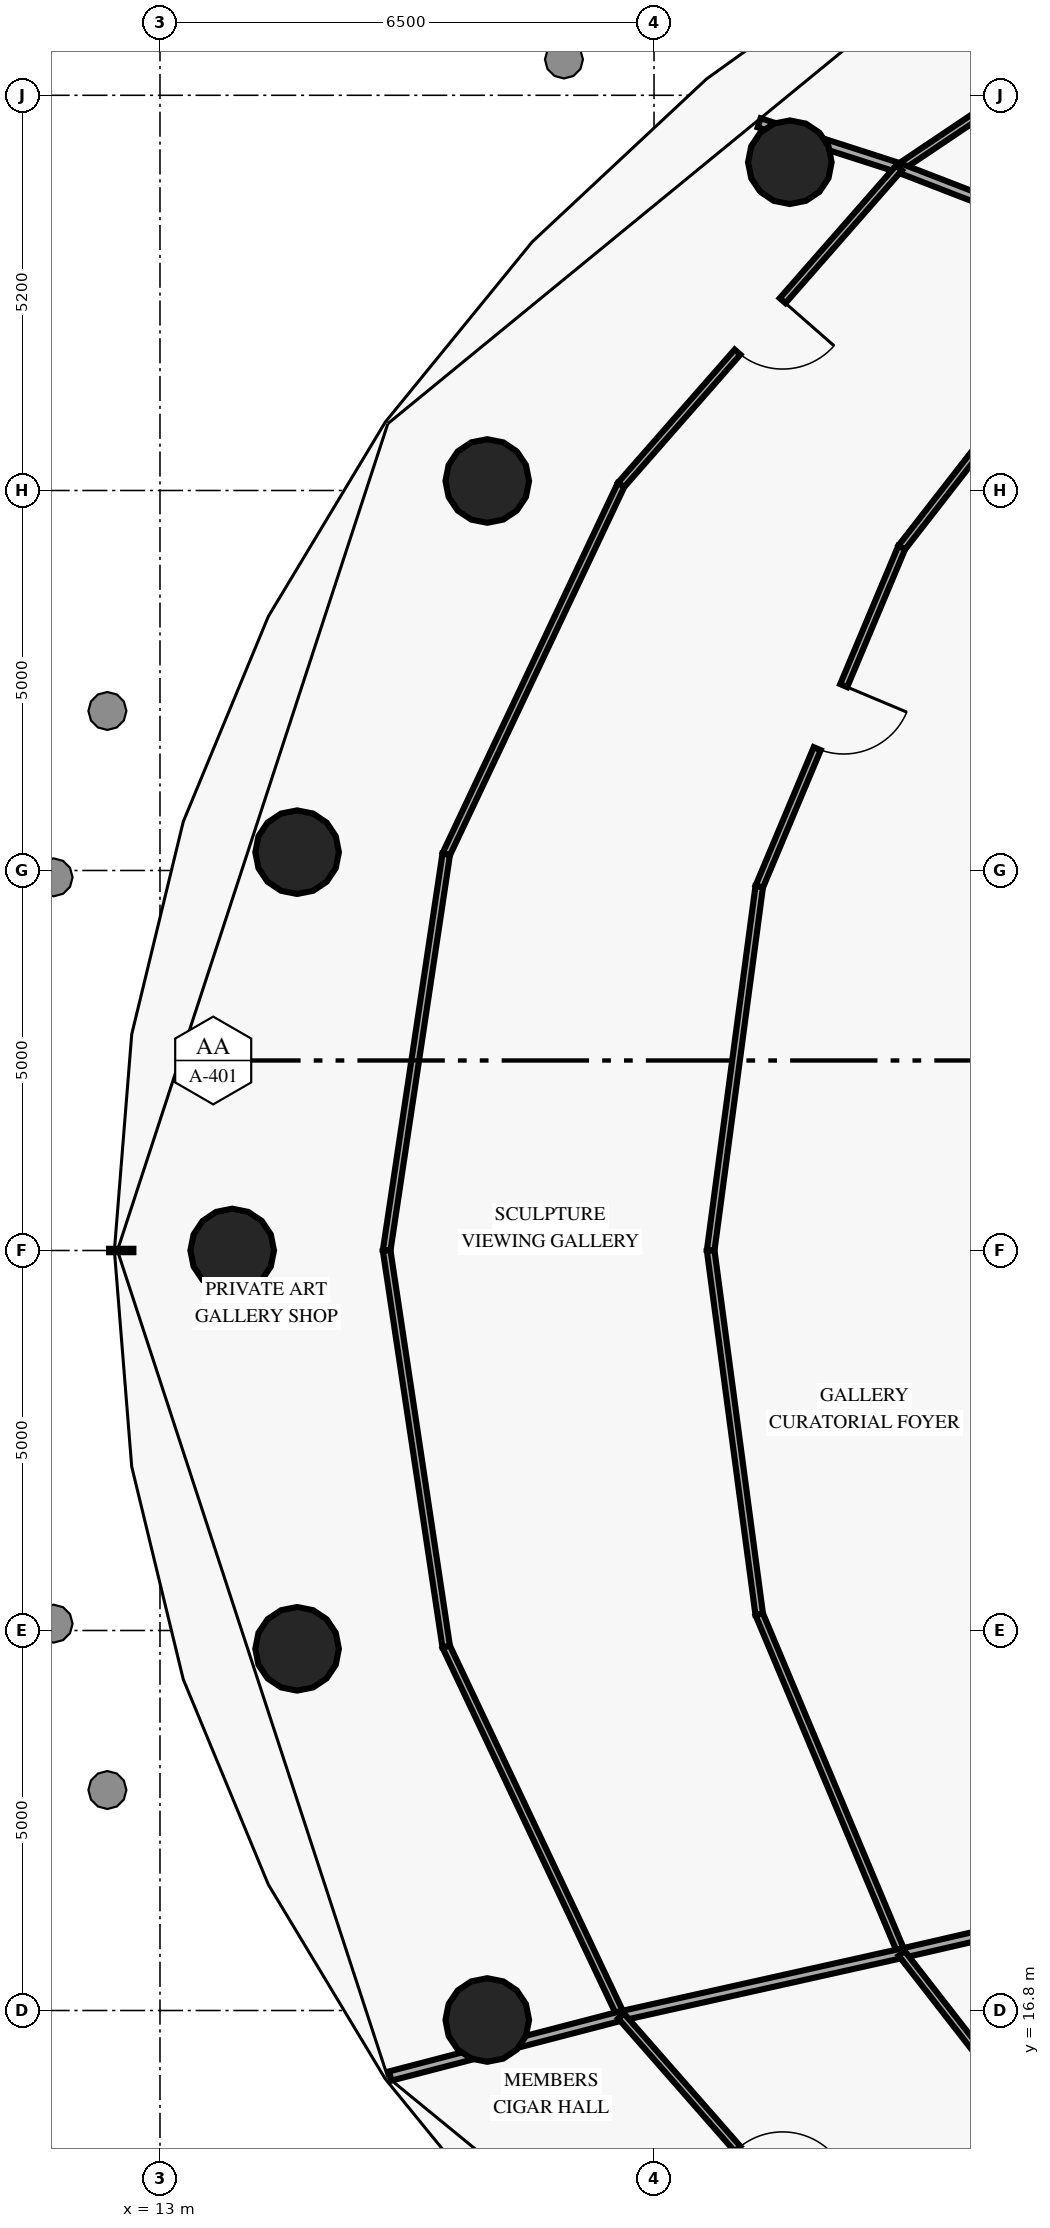
"""IFC4 building model, lengths in metres.
Left out: names, types, materials, properties, quantities, classifications, styles, units other than length and angle.
Written with IfcOpenShell. Run it as: python <this file> out.ifc"""

import sys

from ifc_helpers import new_model, si_unit, direction, frame, frame_2d, origin, origin_2d, place, context, subcontext, project, spatial, rectangle, circle, extrude, element, fill, save


model = new_model("IFC4")
c1 = context("Model", 3, precision=1e-05, world=origin(), true_north=direction((0.0, 1.0)))
c2 = subcontext(c1, "Body", "Model", "MODEL_VIEW")
j1 = project(units=[si_unit("LENGTHUNIT", "METRE"), si_unit("PLANEANGLEUNIT", "RADIAN")], contexts=[c1])
p1 = place(None, origin())
s1 = spatial("IfcSite", under=j1, at=p1, CompositionType="ELEMENT")
p2 = place(p1, origin())
s2 = spatial("IfcBuilding", under=s1, at=p2, CompositionType="ELEMENT")
p3 = place(p2, frame((0.0, 0.0, 102.0)))
s3 = spatial("IfcBuildingStorey", under=s2, at=p3, CompositionType="ELEMENT", Elevation=102.0)
for number, where, z_axis, x_axis in (
    (1, (21.287, 41.119, 0.0), (0.0, 0.0, 1.0), (1.0, 0.0, 0.0)),
    (2, (17.306, 36.925, 0.0), (0.0, 0.0, 1.0), (1.0, 0.0, 0.0)),
    (3, (14.804, 32.041, 0.0), (0.0, 0.0, 1.0), (1.0, 0.0, 0.0)),
    (4, (13.95, 26.8, 0.0), (0.0, 0.0, 1.0), (1.0, 0.0, 0.0)),
    (5, (14.804, 21.559, 0.0), (0.0, 0.0, 1.0), (1.0, 0.0, 0.0)),
    (6, (17.306, 16.675, 0.0), (0.0, 0.0, 1.0), (1.0, 0.0, 0.0)),
):
    element("IfcColumn", number, at=place(p3, frame(where, z_axis=z_axis, x_axis=x_axis)), inside=s3, PredefinedType="COLUMN", context=c2, shape_type="SweptSolid", body=[
        extrude(circle(Radius=0.55, at=origin_2d()), origin(), (0.0, 0.0, 1.0), 3.7),
    ])
p4 = place(p3, frame((27.491, 44.246, 0.0), z_axis=(0.0, 0.0, 1.0), x_axis=(-0.830174745772, -0.557503265893, 0.0)))
e7 = element("IfcWall", 7, at=p4, inside=s3, PredefinedType="MOVABLE", context=c2, shape_type="SweptSolid", body=[
    extrude(rectangle(XDim=5.742, YDim=0.1, at=frame_2d((2.871, 0.0))), origin(), (0.0, 0.0, 1.0), 3.7),
])
p5 = place(p3, frame((24.791, 40.245, 0.0), z_axis=(0.0, 0.0, 1.0), x_axis=(-0.932611158557, 0.360882843779, 0.0)))
e8 = element("IfcWall", 8, at=p5, inside=s3, PredefinedType="PARTITIONING", context=c2, shape_type="SweptSolid", body=[
    extrude(rectangle(XDim=2.216, YDim=0.125, at=frame_2d((1.108, 0.0))), origin(), (0.0, 0.0, 1.0), 3.7),
])
p6 = place(p3, frame((22.724, 41.045, 0.0), z_axis=(0.0, 0.0, 1.0), x_axis=(-0.951840581079, 0.306593392314, 0.0)))
e9 = element("IfcWall", 9, at=p6, inside=s3, PredefinedType="PARTITIONING", context=c2, shape_type="SweptSolid", body=[
    extrude(rectangle(XDim=1.934, YDim=0.125, at=frame_2d((0.967, 0.0))), origin(), (0.0, 0.0, 1.0), 3.7),
])
p7 = place(p3, frame((25.738, 39.879, 0.0), z_axis=(0.0, 0.0, 1.0), x_axis=(-0.613999814684, -0.789306168459, 0.0)))
e10 = element("IfcWall", 10, at=p7, inside=s3, PredefinedType="MOVABLE", context=c2, shape_type="SweptSolid", body=[
    extrude(rectangle(XDim=4.853, YDim=0.1, at=frame_2d((2.427, 0.0))), origin(), (0.0, 0.0, 1.0), 3.7),
])
p8 = place(p3, frame((22.758, 36.048, 0.0), z_axis=(0.0, 0.0, 1.0), x_axis=(-0.387289954907, -0.921957965869, 0.0)))
e11 = element("IfcWall", 11, at=p8, inside=s3, PredefinedType="MOVABLE", context=c2, shape_type="SweptSolid", body=[
    extrude(rectangle(XDim=4.839, YDim=0.1, at=frame_2d((2.419, 0.0))), origin(), (0.0, 0.0, 1.0), 3.7),
])
p9 = place(p8, frame((1.969, 0.0, 0.0)))
e12 = element("IfcOpeningElement", 12, at=p9, cuts=e11, PredefinedType="OPENING", context=c2, shape_type="SweptSolid", body=[
    extrude(rectangle(XDim=0.9, YDim=2.1, at=frame_2d((0.45, 1.05))), frame((0.0, 0.06, 0.0), z_axis=(0.0, -1.0, 0.0), x_axis=(1.0, 0.0, 0.0)), (0.0, 0.0, 1.0), 0.12),
])
p10 = place(p3, frame((20.884, 31.587, 0.0), z_axis=(0.0, 0.0, 1.0), x_axis=(-0.132299485803, -0.991209789125, 0.0)))
e13 = element("IfcWall", 13, at=p10, inside=s3, PredefinedType="MOVABLE", context=c2, shape_type="SweptSolid", body=[
    extrude(rectangle(XDim=4.829, YDim=0.1, at=frame_2d((2.415, 0.0))), origin(), (0.0, 0.0, 1.0), 3.7),
])
p11 = place(p3, frame((20.245, 26.8, 0.0), z_axis=(0.0, 0.0, 1.0), x_axis=(0.132292856672, -0.99121067391, 0.0)))
e14 = element("IfcWall", 14, at=p11, inside=s3, PredefinedType="MOVABLE", context=c2, shape_type="SweptSolid", body=[
    extrude(rectangle(XDim=4.83, YDim=0.1, at=frame_2d((2.415, 0.0))), origin(), (0.0, 0.0, 1.0), 3.7),
])
p12 = place(p3, frame((20.884, 22.013, 0.0), z_axis=(0.0, 0.0, 1.0), x_axis=(0.387307971266, -0.921950397469, 0.0)))
e15 = element("IfcWall", 15, at=p12, inside=s3, PredefinedType="MOVABLE", context=c2, shape_type="SweptSolid", body=[
    extrude(rectangle(XDim=4.839, YDim=0.1, at=frame_2d((2.419, 0.0))), origin(), (0.0, 0.0, 1.0), 3.7),
])
p13 = place(p3, frame((22.724, 41.045, 0.0), z_axis=(0.0, 0.0, 1.0), x_axis=(-0.659301696391, -0.751878496258, 0.0)))
e16 = element("IfcWall", 16, at=p13, inside=s3, PredefinedType="MOVABLE", context=c2, shape_type="SweptSolid", body=[
    extrude(rectangle(XDim=5.549, YDim=0.1, at=frame_2d((2.774, 0.0))), origin(), (0.0, 0.0, 1.0), 3.7),
])
p14 = place(p13, frame((2.324, 0.0, 0.0)))
e17 = element("IfcOpeningElement", 17, at=p14, cuts=e16, PredefinedType="OPENING", context=c2, shape_type="SweptSolid", body=[
    extrude(rectangle(XDim=0.9, YDim=2.1, at=frame_2d((0.45, 1.05))), frame((0.0, 0.06, 0.0), z_axis=(0.0, -1.0, 0.0), x_axis=(1.0, 0.0, 0.0)), (0.0, 0.0, 1.0), 0.12),
])
p15 = place(p3, frame((19.066, 36.873, 0.0), z_axis=(0.0, 0.0, 1.0), x_axis=(-0.42779935224, -0.903873726924, 0.0)))
e18 = element("IfcWall", 18, at=p15, inside=s3, PredefinedType="MOVABLE", context=c2, shape_type="SweptSolid", body=[
    extrude(rectangle(XDim=5.376, YDim=0.1, at=frame_2d((2.688, 0.0))), origin(), (0.0, 0.0, 1.0), 3.7),
])
p16 = place(p3, frame((16.766, 32.014, 0.0), z_axis=(0.0, 0.0, 1.0), x_axis=(-0.148729896957, -0.988877857853, 0.0)))
e19 = element("IfcWall", 19, at=p16, inside=s3, PredefinedType="MOVABLE", context=c2, shape_type="SweptSolid", body=[
    extrude(rectangle(XDim=5.272, YDim=0.1, at=frame_2d((2.636, 0.0))), origin(), (0.0, 0.0, 1.0), 3.7),
])
p17 = place(p3, frame((15.982, 26.8, 0.0), z_axis=(0.0, 0.0, 1.0), x_axis=(0.148723087006, -0.988878882064, 0.0)))
e20 = element("IfcWall", 20, at=p17, inside=s3, PredefinedType="MOVABLE", context=c2, shape_type="SweptSolid", body=[
    extrude(rectangle(XDim=5.273, YDim=0.1, at=frame_2d((2.636, 0.0))), origin(), (0.0, 0.0, 1.0), 3.7),
])
p18 = place(p3, frame((16.766, 21.586, 0.0), z_axis=(0.0, 0.0, 1.0), x_axis=(0.42788717079, -0.903832157578, 0.0)))
e21 = element("IfcWall", 21, at=p18, inside=s3, PredefinedType="MOVABLE", context=c2, shape_type="SweptSolid", body=[
    extrude(rectangle(XDim=5.375, YDim=0.1, at=frame_2d((2.688, 0.0))), origin(), (0.0, 0.0, 1.0), 3.7),
])
p19 = place(p3, frame((26.131, 18.33, 0.0), z_axis=(0.0, 0.0, 1.0), x_axis=(-0.974411399149, -0.224771940438, 0.0)))
e22 = element("IfcWall", 22, at=p19, inside=s3, PredefinedType="PARTITIONING", context=c2, shape_type="SweptSolid", body=[
    extrude(rectangle(XDim=3.462, YDim=0.125, at=frame_2d((1.731, 0.0))), origin(), (0.0, 0.0, 1.0), 3.7),
])
p20 = place(p3, frame((22.758, 17.552, 0.0), z_axis=(0.0, 0.0, 1.0), x_axis=(-0.975990773868, -0.217811866812, 0.0)))
e23 = element("IfcWall", 23, at=p20, inside=s3, PredefinedType="PARTITIONING", context=c2, shape_type="SweptSolid", body=[
    extrude(rectangle(XDim=3.783, YDim=0.125, at=frame_2d((1.892, 0.0))), origin(), (0.0, 0.0, 1.0), 3.7),
])
p21 = place(p3, frame((19.066, 16.728, 0.0), z_axis=(0.0, 0.0, 1.0), x_axis=(-0.967787254354, -0.251769399075, 0.0)))
e24 = element("IfcWall", 24, at=p21, inside=s3, PredefinedType="PARTITIONING", context=c2, shape_type="SweptSolid", body=[
    extrude(rectangle(XDim=3.138, YDim=0.125, at=frame_2d((1.569, 0.0))), origin(), (0.0, 0.0, 1.0), 3.7),
])
p22 = place(p3, frame((22.758, 17.552, 0.0), z_axis=(0.0, 0.0, 1.0), x_axis=(0.613975436768, -0.789325131391, 0.0)))
e25 = element("IfcWall", 25, at=p22, inside=s3, PredefinedType="MOVABLE", context=c2, shape_type="SweptSolid", body=[
    extrude(rectangle(XDim=4.854, YDim=0.1, at=frame_2d((2.427, 0.0))), origin(), (0.0, 0.0, 1.0), 3.7),
])
p23 = place(p3, frame((19.066, 16.728, 0.0), z_axis=(0.0, 0.0, 1.0), x_axis=(0.659192649305, -0.751974102681, 0.0)))
e26 = element("IfcWall", 26, at=p23, inside=s3, PredefinedType="MOVABLE", context=c2, shape_type="SweptSolid", body=[
    extrude(rectangle(XDim=5.55, YDim=0.1, at=frame_2d((2.775, 0.0))), origin(), (0.0, 0.0, 1.0), 3.7),
])
p24 = place(p23, frame((2.325, 0.0, 0.0)))
e27 = element("IfcOpeningElement", 27, at=p24, cuts=e26, PredefinedType="OPENING", context=c2, shape_type="SweptSolid", body=[
    extrude(rectangle(XDim=0.9, YDim=2.1, at=frame_2d((0.45, 1.05))), frame((0.0, 0.06, 0.0), z_axis=(0.0, -1.0, 0.0), x_axis=(1.0, 0.0, 0.0)), (0.0, 0.0, 1.0), 0.12),
])
p25 = place(p9, origin())
e28 = element("IfcDoor", 28, at=p25, inside=s3, OperationType="SINGLE_SWING_LEFT", PredefinedType="DOOR", context=c2, shape_type="SweptSolid", body=[
    extrude(rectangle(XDim=0.9, YDim=2.1, at=frame_2d((0.45, 1.05))), frame((0.0, 0.025, 0.0), z_axis=(0.0, -1.0, 0.0), x_axis=(1.0, 0.0, 0.0)), (0.0, 0.0, 1.0), 0.05),
])
fill(e12, e28)
p26 = place(p14, origin())
e29 = element("IfcDoor", 29, at=p26, inside=s3, OperationType="SINGLE_SWING_LEFT", PredefinedType="DOOR", context=c2, shape_type="SweptSolid", body=[
    extrude(rectangle(XDim=0.9, YDim=2.1, at=frame_2d((0.45, 1.05))), frame((0.0, 0.025, 0.0), z_axis=(0.0, -1.0, 0.0), x_axis=(1.0, 0.0, 0.0)), (0.0, 0.0, 1.0), 0.05),
])
fill(e17, e29)
p27 = place(p24, origin())
e30 = element("IfcDoor", 30, at=p27, inside=s3, OperationType="SINGLE_SWING_RIGHT", PredefinedType="DOOR", context=c2, shape_type="SweptSolid", body=[
    extrude(rectangle(XDim=0.9, YDim=2.1, at=frame_2d((0.45, 1.05))), frame((0.0, 0.025, 0.0), z_axis=(0.0, -1.0, 0.0), x_axis=(1.0, 0.0, 0.0)), (0.0, 0.0, 1.0), 0.05),
])
fill(e27, e30)
save(model, sys.argv[1])
